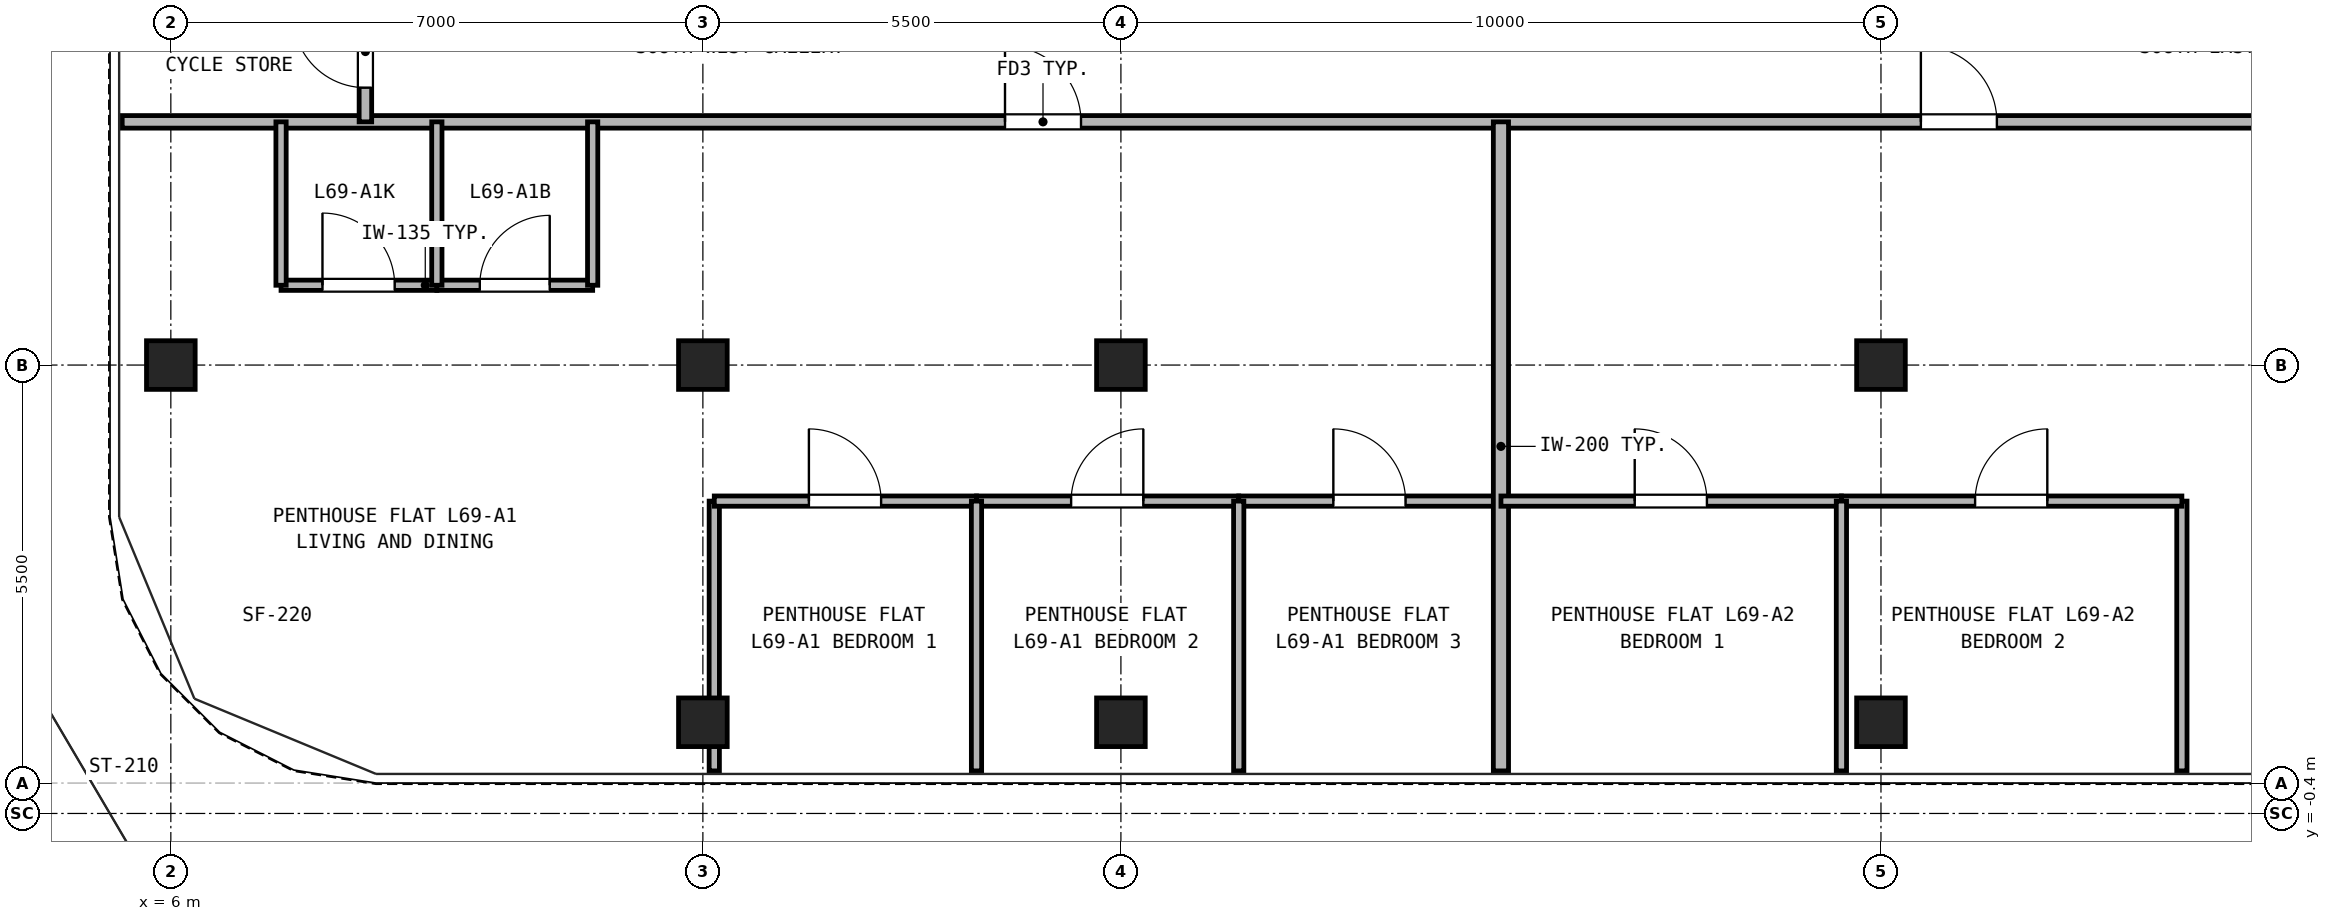
"""IFC4 building model, lengths in metres.
Left out: names, types, materials, properties, quantities, classifications, styles, units other than length and angle.
Written with IfcOpenShell. Run it as: python <this file> out.ifc"""

import sys

from ifc_helpers import new_model, si_unit, direction, frame, frame_2d, origin, origin_2d, place, context, subcontext, project, spatial, rectangle, hollow_rectangle, extrude, source, transform, mapped, element, fill, save


model = new_model("IFC4")
c1 = context("Model", 3, precision=1e-05, world=origin(), true_north=direction((0.0, 1.0)))
c2 = subcontext(c1, "Body", "Model", "MODEL_VIEW")
j1 = project(units=[si_unit("LENGTHUNIT", "METRE"), si_unit("PLANEANGLEUNIT", "RADIAN")], contexts=[c1])
p1 = place(None, origin())
s1 = spatial("IfcSite", under=j1, at=p1, CompositionType="ELEMENT")
p2 = place(p1, origin())
s2 = spatial("IfcBuilding", under=s1, at=p2, CompositionType="ELEMENT")
p3 = place(p2, frame((0.0, 0.0, 242.5)))
s3 = spatial("IfcBuildingStorey", under=s2, at=p3, CompositionType="ELEMENT", Elevation=242.5)
m1 = source(origin(), c2, "Body", "SweptSolid", [
    extrude(hollow_rectangle(XDim=0.64, YDim=0.64, WallThickness=0.035, at=origin_2d()), origin(), (0.0, 0.0, 1.0), 2.98),
])
for number, where, z_axis, x_axis in (
    (1, (13.0, 0.8, 0.0), (0.0, 0.0, 1.0), (1.0, 0.0, 0.0)),
    (2, (18.5, 0.8, 0.0), (0.0, 0.0, 1.0), (1.0, 0.0, 0.0)),
    (3, (28.5, 0.8, 0.0), (0.0, 0.0, 1.0), (1.0, 0.0, 0.0)),
    (4, (6.0, 5.5, 0.0), (0.0, 0.0, 1.0), (1.0, 0.0, 0.0)),
    (5, (13.0, 5.5, 0.0), (0.0, 0.0, 1.0), (1.0, 0.0, 0.0)),
    (6, (18.5, 5.5, 0.0), (0.0, 0.0, 1.0), (1.0, 0.0, 0.0)),
    (7, (28.5, 5.5, 0.0), (0.0, 0.0, 1.0), (1.0, 0.0, 0.0)),
):
    element("IfcColumn", number, at=place(p3, frame(where, z_axis=z_axis, x_axis=x_axis)), inside=s3, PredefinedType="COLUMN", context=c2, shape_type="MappedRepresentation", body=[
        mapped(m1, transform((0.0, 0.0, 0.0), x_axis=(1.0, 0.0, 0.0), y_axis=(0.0, 1.0, 0.0), z_axis=(0.0, 0.0, 1.0), scale=1.0)),
    ])
p4 = place(p3, frame((5.36, 8.7, 0.0), z_axis=(0.0, 0.0, 1.0), x_axis=(1.0, 0.0, 0.0)))
e8 = element("IfcWall", 8, at=p4, inside=s3, PredefinedType="PARTITIONING", context=c2, shape_type="SweptSolid", body=[
    extrude(rectangle(XDim=36.28, YDim=0.165, at=frame_2d((18.14, 0.0))), origin(), (0.0, 0.0, 1.0), 2.655),
])
p5 = place(p4, frame((11.615, 0.0, 0.0)))
e9 = element("IfcOpeningElement", 9, at=p5, cuts=e8, PredefinedType="OPENING", context=c2, shape_type="SweptSolid", body=[
    extrude(rectangle(XDim=1.0, YDim=2.15, at=frame_2d((0.5, 1.075))), frame((0.0, 0.093, 0.0), z_axis=(0.0, -1.0, 0.0), x_axis=(1.0, 0.0, 0.0)), (0.0, 0.0, 1.0), 0.185),
])
p6 = place(p4, frame((23.665, 0.0, 0.0)))
e10 = element("IfcOpeningElement", 10, at=p6, cuts=e8, PredefinedType="OPENING", context=c2, shape_type="SweptSolid", body=[
    extrude(rectangle(XDim=1.0, YDim=2.15, at=frame_2d((0.5, 1.075))), frame((0.0, 0.093, 0.0), z_axis=(0.0, -1.0, 0.0), x_axis=(1.0, 0.0, 0.0)), (0.0, 0.0, 1.0), 0.185),
])
p7 = place(p3, frame((8.56, 8.7, 0.0), z_axis=(0.0, 0.0, 1.0), x_axis=(0.0, 1.0, 0.0)))
e11 = element("IfcWall", 11, at=p7, inside=s3, PredefinedType="PARTITIONING", context=c2, shape_type="SweptSolid", body=[
    extrude(rectangle(XDim=2.0, YDim=0.165, at=frame_2d((1.0, 0.0))), origin(), (0.0, 0.0, 1.0), 2.98),
])
p8 = place(p7, frame((0.45, 0.0, 0.0)))
e12 = element("IfcOpeningElement", 12, at=p8, cuts=e11, PredefinedType="OPENING", context=c2, shape_type="SweptSolid", body=[
    extrude(rectangle(XDim=0.95, YDim=2.15, at=frame_2d((0.475, 1.075))), frame((0.0, 0.093, 0.0), z_axis=(0.0, -1.0, 0.0), x_axis=(1.0, 0.0, 0.0)), (0.0, 0.0, 1.0), 0.185),
])
p9 = place(p3, frame((7.45, 6.55, 0.0), z_axis=(0.0, 0.0, 1.0), x_axis=(1.0, 0.0, 0.0)))
e13 = element("IfcWall", 13, at=p9, inside=s3, PredefinedType="PARTITIONING", context=c2, shape_type="SweptSolid", body=[
    extrude(rectangle(XDim=2.05, YDim=0.135, at=frame_2d((1.025, 0.0))), origin(), (0.0, 0.0, 1.0), 2.98),
])
p10 = place(p9, frame((0.545, 0.0, 0.0)))
e14 = element("IfcOpeningElement", 14, at=p10, cuts=e13, PredefinedType="OPENING", context=c2, shape_type="SweptSolid", body=[
    extrude(rectangle(XDim=0.95, YDim=2.15, at=frame_2d((0.475, 1.075))), frame((0.0, 0.077, 0.0), z_axis=(0.0, -1.0, 0.0), x_axis=(1.0, 0.0, 0.0)), (0.0, 0.0, 1.0), 0.155),
])
p11 = place(p3, frame((9.5, 6.55, 0.0), z_axis=(0.0, 0.0, 1.0), x_axis=(1.0, 0.0, 0.0)))
e15 = element("IfcWall", 15, at=p11, inside=s3, PredefinedType="PARTITIONING", context=c2, shape_type="SweptSolid", body=[
    extrude(rectangle(XDim=2.05, YDim=0.135, at=frame_2d((1.025, 0.0))), origin(), (0.0, 0.0, 1.0), 2.98),
])
p12 = place(p11, frame((0.565, 0.0, 0.0)))
e16 = element("IfcOpeningElement", 16, at=p12, cuts=e15, PredefinedType="OPENING", context=c2, shape_type="SweptSolid", body=[
    extrude(rectangle(XDim=0.92, YDim=2.1, at=frame_2d((0.46, 1.05))), frame((0.0, 0.077, 0.0), z_axis=(0.0, -1.0, 0.0), x_axis=(1.0, 0.0, 0.0)), (0.0, 0.0, 1.0), 0.155),
])
for number, where, z_axis, x_axis in (
    (17, (7.45, 6.55, 0.0), (0.0, 0.0, 1.0), (0.0, 1.0, 0.0)),
    (18, (9.5, 6.55, 0.0), (0.0, 0.0, 1.0), (0.0, 1.0, 0.0)),
    (19, (11.55, 6.55, 0.0), (0.0, 0.0, 1.0), (0.0, 1.0, 0.0)),
):
    element("IfcWall", number, at=place(p3, frame(where, z_axis=z_axis, x_axis=x_axis)), inside=s3, PredefinedType="PARTITIONING", context=c2, shape_type="SweptSolid", body=[
        extrude(rectangle(XDim=2.15, YDim=0.135, at=frame_2d((1.075, 0.0))), origin(), (0.0, 0.0, 1.0), 2.98),
    ])
p13 = place(p3, frame((13.15, 0.16, 0.0), z_axis=(0.0, 0.0, 1.0), x_axis=(0.0, 1.0, 0.0)))
e20 = element("IfcWall", 20, at=p13, inside=s3, PredefinedType="PARTITIONING", context=c2, shape_type="SweptSolid", body=[
    extrude(rectangle(XDim=3.55, YDim=0.135, at=frame_2d((1.775, 0.0))), origin(), (0.0, 0.0, 1.0), 2.428),
])
p14 = place(p3, frame((13.15, 3.71, 0.0), z_axis=(0.0, 0.0, 1.0), x_axis=(1.0, 0.0, 0.0)))
e21 = element("IfcWall", 21, at=p14, inside=s3, PredefinedType="PARTITIONING", context=c2, shape_type="SweptSolid", body=[
    extrude(rectangle(XDim=3.45, YDim=0.135, at=frame_2d((1.725, 0.0))), origin(), (0.0, 0.0, 1.0), 2.98),
])
p15 = place(p14, frame((1.245, 0.0, 0.0)))
e22 = element("IfcOpeningElement", 22, at=p15, cuts=e21, PredefinedType="OPENING", context=c2, shape_type="SweptSolid", body=[
    extrude(rectangle(XDim=0.95, YDim=2.15, at=frame_2d((0.475, 1.075))), frame((0.0, 0.077, 0.0), z_axis=(0.0, -1.0, 0.0), x_axis=(1.0, 0.0, 0.0)), (0.0, 0.0, 1.0), 0.155),
])
p16 = place(p3, frame((16.6, 3.71, 0.0), z_axis=(0.0, 0.0, 1.0), x_axis=(1.0, 0.0, 0.0)))
e23 = element("IfcWall", 23, at=p16, inside=s3, PredefinedType="PARTITIONING", context=c2, shape_type="SweptSolid", body=[
    extrude(rectangle(XDim=3.45, YDim=0.135, at=frame_2d((1.725, 0.0))), origin(), (0.0, 0.0, 1.0), 2.98),
])
p17 = place(p16, frame((1.245, 0.0, 0.0)))
e24 = element("IfcOpeningElement", 24, at=p17, cuts=e23, PredefinedType="OPENING", context=c2, shape_type="SweptSolid", body=[
    extrude(rectangle(XDim=0.95, YDim=2.15, at=frame_2d((0.475, 1.075))), frame((0.0, 0.077, 0.0), z_axis=(0.0, -1.0, 0.0), x_axis=(1.0, 0.0, 0.0)), (0.0, 0.0, 1.0), 0.155),
])
p18 = place(p3, frame((16.6, 0.16, 0.0), z_axis=(0.0, 0.0, 1.0), x_axis=(0.0, 1.0, 0.0)))
e25 = element("IfcWall", 25, at=p18, inside=s3, PredefinedType="PARTITIONING", context=c2, shape_type="SweptSolid", body=[
    extrude(rectangle(XDim=3.55, YDim=0.135, at=frame_2d((1.775, 0.0))), origin(), (0.0, 0.0, 1.0), 2.98),
])
p19 = place(p3, frame((20.05, 3.71, 0.0), z_axis=(0.0, 0.0, 1.0), x_axis=(1.0, 0.0, 0.0)))
e26 = element("IfcWall", 26, at=p19, inside=s3, PredefinedType="PARTITIONING", context=c2, shape_type="SweptSolid", body=[
    extrude(rectangle(XDim=3.45, YDim=0.135, at=frame_2d((1.725, 0.0))), origin(), (0.0, 0.0, 1.0), 2.98),
])
p20 = place(p19, frame((1.245, 0.0, 0.0)))
e27 = element("IfcOpeningElement", 27, at=p20, cuts=e26, PredefinedType="OPENING", context=c2, shape_type="SweptSolid", body=[
    extrude(rectangle(XDim=0.95, YDim=2.15, at=frame_2d((0.475, 1.075))), frame((0.0, 0.077, 0.0), z_axis=(0.0, -1.0, 0.0), x_axis=(1.0, 0.0, 0.0)), (0.0, 0.0, 1.0), 0.155),
])
p21 = place(p3, frame((20.05, 0.16, 0.0), z_axis=(0.0, 0.0, 1.0), x_axis=(0.0, 1.0, 0.0)))
e28 = element("IfcWall", 28, at=p21, inside=s3, PredefinedType="PARTITIONING", context=c2, shape_type="SweptSolid", body=[
    extrude(rectangle(XDim=3.55, YDim=0.135, at=frame_2d((1.775, 0.0))), origin(), (0.0, 0.0, 1.0), 2.98),
])
p22 = place(p3, frame((23.5, 0.16, 0.0), z_axis=(0.0, 0.0, 1.0), x_axis=(0.0, 1.0, 0.0)))
e29 = element("IfcWall", 29, at=p22, inside=s3, PredefinedType="PARTITIONING", context=c2, shape_type="SweptSolid", body=[
    extrude(rectangle(XDim=8.54, YDim=0.2, at=frame_2d((4.27, 0.0))), origin(), (0.0, 0.0, 1.0), 2.98),
])
p23 = place(p3, frame((32.459, 0.16, 0.0), z_axis=(0.0, 0.0, 1.0), x_axis=(0.0, 1.0, 0.0)))
e30 = element("IfcWall", 30, at=p23, inside=s3, PredefinedType="PARTITIONING", context=c2, shape_type="SweptSolid", body=[
    extrude(rectangle(XDim=3.55, YDim=0.135, at=frame_2d((1.775, 0.0))), origin(), (0.0, 0.0, 1.0), 2.98),
])
p24 = place(p3, frame((23.5, 3.71, 0.0), z_axis=(0.0, 0.0, 1.0), x_axis=(1.0, 0.0, 0.0)))
e31 = element("IfcWall", 31, at=p24, inside=s3, PredefinedType="PARTITIONING", context=c2, shape_type="SweptSolid", body=[
    extrude(rectangle(XDim=4.479, YDim=0.135, at=frame_2d((2.24, 0.0))), origin(), (0.0, 0.0, 1.0), 2.98),
])
p25 = place(p24, frame((1.76, 0.0, 0.0)))
e32 = element("IfcOpeningElement", 32, at=p25, cuts=e31, PredefinedType="OPENING", context=c2, shape_type="SweptSolid", body=[
    extrude(rectangle(XDim=0.95, YDim=2.15, at=frame_2d((0.475, 1.075))), frame((0.0, 0.077, 0.0), z_axis=(0.0, -1.0, 0.0), x_axis=(1.0, 0.0, 0.0)), (0.0, 0.0, 1.0), 0.155),
])
p26 = place(p3, frame((27.979, 3.71, 0.0), z_axis=(0.0, 0.0, 1.0), x_axis=(1.0, 0.0, 0.0)))
e33 = element("IfcWall", 33, at=p26, inside=s3, PredefinedType="PARTITIONING", context=c2, shape_type="SweptSolid", body=[
    extrude(rectangle(XDim=4.479, YDim=0.135, at=frame_2d((2.24, 0.0))), origin(), (0.0, 0.0, 1.0), 2.98),
])
p27 = place(p26, frame((1.759, 0.0, 0.0)))
e34 = element("IfcOpeningElement", 34, at=p27, cuts=e33, PredefinedType="OPENING", context=c2, shape_type="SweptSolid", body=[
    extrude(rectangle(XDim=0.95, YDim=2.15, at=frame_2d((0.475, 1.075))), frame((0.0, 0.077, 0.0), z_axis=(0.0, -1.0, 0.0), x_axis=(1.0, 0.0, 0.0)), (0.0, 0.0, 1.0), 0.155),
])
p28 = place(p3, frame((27.979, 0.16, 0.0), z_axis=(0.0, 0.0, 1.0), x_axis=(0.0, 1.0, 0.0)))
e35 = element("IfcWall", 35, at=p28, inside=s3, PredefinedType="PARTITIONING", context=c2, shape_type="SweptSolid", body=[
    extrude(rectangle(XDim=3.55, YDim=0.135, at=frame_2d((1.775, 0.0))), origin(), (0.0, 0.0, 1.0), 2.98),
])
p29 = place(p10, origin())
e36 = element("IfcDoor", 36, at=p29, inside=s3, OperationType="SINGLE_SWING_LEFT", PredefinedType="DOOR", context=c2, shape_type="SweptSolid", body=[
    extrude(rectangle(XDim=0.95, YDim=2.15, at=frame_2d((0.475, 1.075))), frame((0.0, 0.025, 0.0), z_axis=(0.0, -1.0, 0.0), x_axis=(1.0, 0.0, 0.0)), (0.0, 0.0, 1.0), 0.05),
])
fill(e14, e36)
p30 = place(p12, origin())
e37 = element("IfcDoor", 37, at=p30, inside=s3, OperationType="SINGLE_SWING_RIGHT", PredefinedType="DOOR", context=c2, shape_type="SweptSolid", body=[
    extrude(rectangle(XDim=0.92, YDim=2.1, at=frame_2d((0.46, 1.05))), frame((0.0, 0.025, 0.0), z_axis=(0.0, -1.0, 0.0), x_axis=(1.0, 0.0, 0.0)), (0.0, 0.0, 1.0), 0.05),
])
fill(e16, e37)
p31 = place(p15, frame((0.95, 0.0, 0.0), z_axis=(0.0, 0.0, 1.0), x_axis=(-1.0, 0.0, 0.0)))
e38 = element("IfcDoor", 38, at=p31, inside=s3, OperationType="SINGLE_SWING_LEFT", PredefinedType="DOOR", context=c2, shape_type="SweptSolid", body=[
    extrude(rectangle(XDim=0.95, YDim=2.15, at=frame_2d((0.475, 1.075))), frame((0.0, 0.025, 0.0), z_axis=(0.0, -1.0, 0.0), x_axis=(1.0, 0.0, 0.0)), (0.0, 0.0, 1.0), 0.05),
])
fill(e22, e38)
p32 = place(p17, frame((0.95, 0.0, 0.0), z_axis=(0.0, 0.0, 1.0), x_axis=(-1.0, 0.0, 0.0)))
e39 = element("IfcDoor", 39, at=p32, inside=s3, OperationType="SINGLE_SWING_RIGHT", PredefinedType="DOOR", context=c2, shape_type="SweptSolid", body=[
    extrude(rectangle(XDim=0.95, YDim=2.15, at=frame_2d((0.475, 1.075))), frame((0.0, 0.025, 0.0), z_axis=(0.0, -1.0, 0.0), x_axis=(1.0, 0.0, 0.0)), (0.0, 0.0, 1.0), 0.05),
])
fill(e24, e39)
p33 = place(p20, frame((0.95, 0.0, 0.0), z_axis=(0.0, 0.0, 1.0), x_axis=(-1.0, 0.0, 0.0)))
e40 = element("IfcDoor", 40, at=p33, inside=s3, OperationType="SINGLE_SWING_LEFT", PredefinedType="DOOR", context=c2, shape_type="SweptSolid", body=[
    extrude(rectangle(XDim=0.95, YDim=2.15, at=frame_2d((0.475, 1.075))), frame((0.0, 0.025, 0.0), z_axis=(0.0, -1.0, 0.0), x_axis=(1.0, 0.0, 0.0)), (0.0, 0.0, 1.0), 0.05),
])
fill(e27, e40)
p34 = place(p5, frame((1.0, 0.0, 0.0), z_axis=(0.0, 0.0, 1.0), x_axis=(-1.0, 0.0, 0.0)))
e41 = element("IfcDoor", 41, at=p34, inside=s3, OperationType="SINGLE_SWING_LEFT", PredefinedType="DOOR", context=c2, shape_type="SweptSolid", body=[
    extrude(rectangle(XDim=1.0, YDim=2.15, at=frame_2d((0.5, 1.075))), frame((0.0, 0.025, 0.0), z_axis=(0.0, -1.0, 0.0), x_axis=(1.0, 0.0, 0.0)), (0.0, 0.0, 1.0), 0.05),
])
fill(e9, e41)
p35 = place(p25, frame((0.95, 0.0, 0.0), z_axis=(0.0, 0.0, 1.0), x_axis=(-1.0, 0.0, 0.0)))
e42 = element("IfcDoor", 42, at=p35, inside=s3, OperationType="SINGLE_SWING_LEFT", PredefinedType="DOOR", context=c2, shape_type="SweptSolid", body=[
    extrude(rectangle(XDim=0.95, YDim=2.15, at=frame_2d((0.475, 1.075))), frame((0.0, 0.025, 0.0), z_axis=(0.0, -1.0, 0.0), x_axis=(1.0, 0.0, 0.0)), (0.0, 0.0, 1.0), 0.05),
])
fill(e32, e42)
p36 = place(p27, frame((0.95, 0.0, 0.0), z_axis=(0.0, 0.0, 1.0), x_axis=(-1.0, 0.0, 0.0)))
e43 = element("IfcDoor", 43, at=p36, inside=s3, OperationType="SINGLE_SWING_RIGHT", PredefinedType="DOOR", context=c2, shape_type="SweptSolid", body=[
    extrude(rectangle(XDim=0.95, YDim=2.15, at=frame_2d((0.475, 1.075))), frame((0.0, 0.025, 0.0), z_axis=(0.0, -1.0, 0.0), x_axis=(1.0, 0.0, 0.0)), (0.0, 0.0, 1.0), 0.05),
])
fill(e34, e43)
p37 = place(p6, frame((1.0, 0.0, 0.0), z_axis=(0.0, 0.0, 1.0), x_axis=(-1.0, 0.0, 0.0)))
e44 = element("IfcDoor", 44, at=p37, inside=s3, OperationType="SINGLE_SWING_LEFT", PredefinedType="DOOR", context=c2, shape_type="SweptSolid", body=[
    extrude(rectangle(XDim=1.0, YDim=2.15, at=frame_2d((0.5, 1.075))), frame((0.0, 0.025, 0.0), z_axis=(0.0, -1.0, 0.0), x_axis=(1.0, 0.0, 0.0)), (0.0, 0.0, 1.0), 0.05),
])
fill(e10, e44)
p38 = place(p8, frame((0.95, 0.0, 0.0), z_axis=(0.0, 0.0, 1.0), x_axis=(-1.0, 0.0, 0.0)))
e45 = element("IfcDoor", 45, at=p38, inside=s3, OperationType="SINGLE_SWING_RIGHT", PredefinedType="DOOR", context=c2, shape_type="SweptSolid", body=[
    extrude(rectangle(XDim=0.95, YDim=2.15, at=frame_2d((0.475, 1.075))), frame((0.0, 0.025, 0.0), z_axis=(0.0, -1.0, 0.0), x_axis=(1.0, 0.0, 0.0)), (0.0, 0.0, 1.0), 0.05),
])
fill(e12, e45)
save(model, sys.argv[1])
